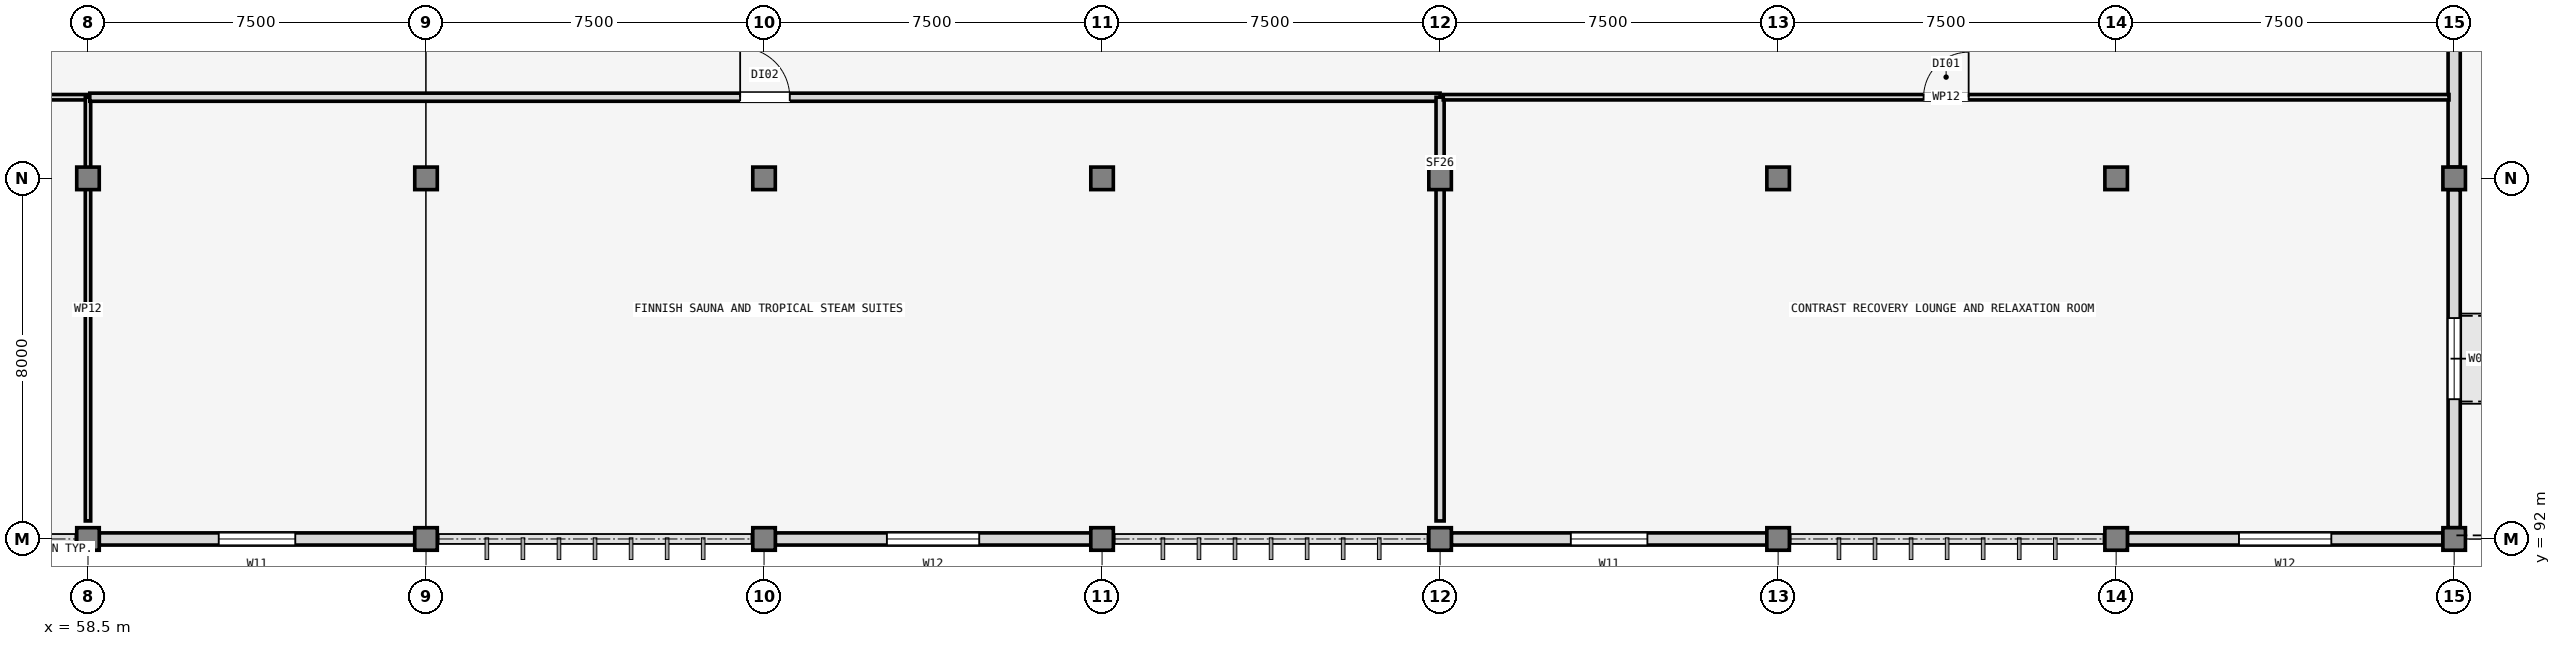
"""IFC4 building model, lengths in metres.
Left out: names, types, materials, properties, quantities, classifications, styles, units other than length and angle.
Written with IfcOpenShell. Run it as: python <this file> out.ifc"""

import sys

from ifc_helpers import new_model, si_unit, direction, frame, frame_2d, origin, origin_2d, place, context, subcontext, project, spatial, rectangle, extrude, element, fill, save


model = new_model("IFC4")
c1 = context("Model", 3, precision=1e-05, world=origin(), true_north=direction((0.0, 1.0)))
c2 = subcontext(c1, "Body", "Model", "MODEL_VIEW")
j1 = project(units=[si_unit("LENGTHUNIT", "METRE"), si_unit("PLANEANGLEUNIT", "RADIAN")], contexts=[c1])
p1 = place(None, origin())
s1 = spatial("IfcSite", under=j1, at=p1, CompositionType="ELEMENT")
p2 = place(p1, origin())
s2 = spatial("IfcBuilding", under=s1, at=p2, CompositionType="ELEMENT")
p3 = place(p2, frame((0.0, 0.0, 13.5)))
s3 = spatial("IfcBuildingStorey", under=s2, at=p3, CompositionType="ELEMENT", Elevation=13.5)
for number, where, z_axis, x_axis in (
    (1, (58.5, 92.0, 0.0), (0.0, 0.0, 1.0), (1.0, 0.0, 0.0)),
    (2, (58.5, 100.0, 0.0), (0.0, 0.0, 1.0), (1.0, 0.0, 0.0)),
    (3, (66.0, 92.0, 0.0), (0.0, 0.0, 1.0), (1.0, 0.0, 0.0)),
    (4, (66.0, 100.0, 0.0), (0.0, 0.0, 1.0), (1.0, 0.0, 0.0)),
    (5, (73.5, 92.0, 0.0), (0.0, 0.0, 1.0), (1.0, 0.0, 0.0)),
    (6, (73.5, 100.0, 0.0), (0.0, 0.0, 1.0), (1.0, 0.0, 0.0)),
    (7, (81.0, 92.0, 0.0), (0.0, 0.0, 1.0), (1.0, 0.0, 0.0)),
    (8, (81.0, 100.0, 0.0), (0.0, 0.0, 1.0), (1.0, 0.0, 0.0)),
    (9, (88.5, 92.0, 0.0), (0.0, 0.0, 1.0), (1.0, 0.0, 0.0)),
    (10, (88.5, 100.0, 0.0), (0.0, 0.0, 1.0), (1.0, 0.0, 0.0)),
    (11, (96.0, 92.0, 0.0), (0.0, 0.0, 1.0), (1.0, 0.0, 0.0)),
    (12, (96.0, 100.0, 0.0), (0.0, 0.0, 1.0), (1.0, 0.0, 0.0)),
    (13, (103.5, 92.0, 0.0), (0.0, 0.0, 1.0), (1.0, 0.0, 0.0)),
    (14, (103.5, 100.0, 0.0), (0.0, 0.0, 1.0), (1.0, 0.0, 0.0)),
    (15, (111.0, 92.0, 0.0), (0.0, 0.0, 1.0), (1.0, 0.0, 0.0)),
    (16, (111.0, 100.0, 0.0), (0.0, 0.0, 1.0), (1.0, 0.0, 0.0)),
):
    element("IfcColumn", number, at=place(p3, frame(where, z_axis=z_axis, x_axis=x_axis)), inside=s3, PredefinedType="COLUMN", context=c2, shape_type="SweptSolid", body=[
        extrude(rectangle(XDim=0.5, YDim=0.5, at=origin_2d()), origin(), (0.0, 0.0, 1.0), 4.2),
    ])
p4 = place(p3, frame((58.75, 92.0, 0.0), z_axis=(0.0, 0.0, 1.0), x_axis=(1.0, 0.0, 0.0)))
e17 = element("IfcWall", 17, at=p4, inside=s3, PredefinedType="SOLIDWALL", context=c2, shape_type="SweptSolid", body=[
    extrude(rectangle(XDim=7.0, YDim=0.27, at=frame_2d((3.5, 0.0))), origin(), (0.0, 0.0, 1.0), 3.44),
])
p5 = place(p4, frame((2.65, 0.0, 0.95)))
e18 = element("IfcOpeningElement", 18, at=p5, cuts=e17, PredefinedType="OPENING", context=c2, shape_type="SweptSolid", body=[
    extrude(rectangle(XDim=1.7, YDim=1.55, at=frame_2d((0.85, 0.775))), frame((0.0, 0.145, 0.0), z_axis=(0.0, -1.0, 0.0), x_axis=(1.0, 0.0, 0.0)), (0.0, 0.0, 1.0), 0.29),
])
p6 = place(p3, frame((73.75, 92.0, 0.0), z_axis=(0.0, 0.0, 1.0), x_axis=(1.0, 0.0, 0.0)))
e19 = element("IfcWall", 19, at=p6, inside=s3, PredefinedType="SOLIDWALL", context=c2, shape_type="SweptSolid", body=[
    extrude(rectangle(XDim=7.0, YDim=0.27, at=frame_2d((3.5, 0.0))), origin(), (0.0, 0.0, 1.0), 3.43),
])
p7 = place(p6, frame((2.475, 0.0, 0.95)))
e20 = element("IfcOpeningElement", 20, at=p7, cuts=e19, PredefinedType="OPENING", context=c2, shape_type="SweptSolid", body=[
    extrude(rectangle(XDim=2.05, YDim=1.4, at=frame_2d((1.025, 0.7))), frame((0.0, 0.145, 0.0), z_axis=(0.0, -1.0, 0.0), x_axis=(1.0, 0.0, 0.0)), (0.0, 0.0, 1.0), 0.29),
])
p8 = place(p3, frame((88.75, 92.0, 0.0), z_axis=(0.0, 0.0, 1.0), x_axis=(1.0, 0.0, 0.0)))
e21 = element("IfcWall", 21, at=p8, inside=s3, PredefinedType="SOLIDWALL", context=c2, shape_type="SweptSolid", body=[
    extrude(rectangle(XDim=7.0, YDim=0.27, at=frame_2d((3.5, 0.0))), origin(), (0.0, 0.0, 1.0), 3.43),
])
p9 = place(p8, frame((2.65, 0.0, 0.95)))
e22 = element("IfcOpeningElement", 22, at=p9, cuts=e21, PredefinedType="OPENING", context=c2, shape_type="SweptSolid", body=[
    extrude(rectangle(XDim=1.7, YDim=1.55, at=frame_2d((0.85, 0.775))), frame((0.0, 0.145, 0.0), z_axis=(0.0, -1.0, 0.0), x_axis=(1.0, 0.0, 0.0)), (0.0, 0.0, 1.0), 0.29),
])
p10 = place(p3, frame((103.75, 92.0, 0.0), z_axis=(0.0, 0.0, 1.0), x_axis=(1.0, 0.0, 0.0)))
e23 = element("IfcWall", 23, at=p10, inside=s3, PredefinedType="SOLIDWALL", context=c2, shape_type="SweptSolid", body=[
    extrude(rectangle(XDim=7.0, YDim=0.27, at=frame_2d((3.5, 0.0))), origin(), (0.0, 0.0, 1.0), 3.43),
])
p11 = place(p10, frame((2.475, 0.0, 0.95)))
e24 = element("IfcOpeningElement", 24, at=p11, cuts=e23, PredefinedType="OPENING", context=c2, shape_type="SweptSolid", body=[
    extrude(rectangle(XDim=2.05, YDim=1.4, at=frame_2d((1.025, 0.7))), frame((0.0, 0.145, 0.0), z_axis=(0.0, -1.0, 0.0), x_axis=(1.0, 0.0, 0.0)), (0.0, 0.0, 1.0), 0.29),
])
p12 = place(p3, frame((111.0, 92.25, 0.0), z_axis=(0.0, 0.0, 1.0), x_axis=(0.0, 1.0, 0.0)))
e25 = element("IfcWall", 25, at=p12, inside=s3, PredefinedType="SOLIDWALL", context=c2, shape_type="SweptSolid", body=[
    extrude(rectangle(XDim=7.5, YDim=0.27, at=frame_2d((3.75, 0.0))), origin(), (0.0, 0.0, 1.0), 3.43),
])
p13 = place(p12, frame((2.85, 0.0, 0.95)))
e26 = element("IfcOpeningElement", 26, at=p13, cuts=e25, PredefinedType="OPENING", context=c2, shape_type="SweptSolid", body=[
    extrude(rectangle(XDim=1.8, YDim=1.5, at=frame_2d((0.9, 0.75))), frame((0.0, 0.145, 0.0), z_axis=(0.0, -1.0, 0.0), x_axis=(1.0, 0.0, 0.0)), (0.0, 0.0, 1.0), 0.29),
])
p14 = place(p3, frame((111.0, 100.25, 0.0), z_axis=(0.0, 0.0, 1.0), x_axis=(0.0, 1.0, 0.0)))
e27 = element("IfcWall", 27, at=p14, inside=s3, PredefinedType="SOLIDWALL", context=c2, shape_type="SweptSolid", body=[
    extrude(rectangle(XDim=7.5, YDim=0.27, at=frame_2d((3.75, 0.0))), origin(), (0.0, 0.0, 1.0), 3.43),
])
p15 = place(p14, frame((2.95, 0.0, 0.0)))
e28 = element("IfcOpeningElement", 28, at=p15, cuts=e27, PredefinedType="OPENING", context=c2, shape_type="SweptSolid", body=[
    extrude(rectangle(XDim=1.6, YDim=2.2, at=frame_2d((0.8, 1.1))), frame((0.0, 0.145, 0.0), z_axis=(0.0, -1.0, 0.0), x_axis=(1.0, 0.0, 0.0)), (0.0, 0.0, 1.0), 0.29),
])
p16 = place(p3, frame((28.2, 101.8, 0.0), z_axis=(0.0, 0.0, 1.0), x_axis=(1.0, 0.0, 0.0)))
e29 = element("IfcWall", 29, at=p16, inside=s3, PredefinedType="PARTITIONING", context=c2, shape_type="SweptSolid", body=[
    extrude(rectangle(XDim=30.3, YDim=0.12, at=frame_2d((15.15, 0.0))), origin(), (0.0, 0.0, 1.0), 3.12),
])
p17 = place(p16, frame((14.65, 0.0, 0.0)))
e30 = element("IfcOpeningElement", 30, at=p17, cuts=e29, PredefinedType="OPENING", context=c2, shape_type="SweptSolid", body=[
    extrude(rectangle(XDim=1.0, YDim=2.1, at=frame_2d((0.5, 1.05))), frame((0.0, 0.07, 0.0), z_axis=(0.0, -1.0, 0.0), x_axis=(1.0, 0.0, 0.0)), (0.0, 0.0, 1.0), 0.14),
])
p18 = place(p3, frame((58.5, 101.8, 0.0), z_axis=(0.0, 0.0, 1.0), x_axis=(0.0, -1.0, 0.0)))
e31 = element("IfcWall", 31, at=p18, inside=s3, PredefinedType="PARTITIONING", context=c2, shape_type="SweptSolid", body=[
    extrude(rectangle(XDim=9.4, YDim=0.12, at=frame_2d((4.7, 0.0))), origin(), (0.0, 0.0, 1.0), 3.12),
])
p19 = place(p3, frame((58.54, 101.8, 0.0), z_axis=(0.0, 0.0, 1.0), x_axis=(1.0, 0.0, 0.0)))
e32 = element("IfcWall", 32, at=p19, inside=s3, PredefinedType="PARTITIONING", context=c2, shape_type="SweptSolid", body=[
    extrude(rectangle(XDim=29.96, YDim=0.18, at=frame_2d((14.98, 0.0))), origin(), (0.0, 0.0, 1.0), 3.12),
])
p20 = place(p19, frame((14.43, 0.0, 0.0)))
e33 = element("IfcOpeningElement", 33, at=p20, cuts=e32, PredefinedType="OPENING", context=c2, shape_type="SweptSolid", body=[
    extrude(rectangle(XDim=1.1, YDim=2.1, at=frame_2d((0.55, 1.05))), frame((0.0, 0.1, 0.0), z_axis=(0.0, -1.0, 0.0), x_axis=(1.0, 0.0, 0.0)), (0.0, 0.0, 1.0), 0.2),
])
p21 = place(p3, frame((88.5, 101.8, 0.0), z_axis=(0.0, 0.0, 1.0), x_axis=(0.0, -1.0, 0.0)))
e34 = element("IfcWall", 34, at=p21, inside=s3, PredefinedType="PARTITIONING", context=c2, shape_type="SweptSolid", body=[
    extrude(rectangle(XDim=9.4, YDim=0.18, at=frame_2d((4.7, 0.0))), origin(), (0.0, 0.0, 1.0), 3.12),
])
p22 = place(p3, frame((88.57, 101.8, 0.0), z_axis=(0.0, 0.0, 1.0), x_axis=(1.0, 0.0, 0.0)))
e35 = element("IfcWall", 35, at=p22, inside=s3, PredefinedType="PARTITIONING", context=c2, shape_type="SweptSolid", body=[
    extrude(rectangle(XDim=22.315, YDim=0.12, at=frame_2d((11.157, 0.0))), origin(), (0.0, 0.0, 1.0), 3.12),
])
p23 = place(p22, frame((10.657, 0.0, 0.0)))
e36 = element("IfcOpeningElement", 36, at=p23, cuts=e35, PredefinedType="OPENING", context=c2, shape_type="SweptSolid", body=[
    extrude(rectangle(XDim=1.0, YDim=2.1, at=frame_2d((0.5, 1.05))), frame((0.0, 0.07, 0.0), z_axis=(0.0, -1.0, 0.0), x_axis=(1.0, 0.0, 0.0)), (0.0, 0.0, 1.0), 0.14),
])
p24 = place(p5, origin())
e37 = element("IfcWindow", 37, at=p24, inside=s3, PartitioningType="SINGLE_PANEL", PredefinedType="WINDOW", context=c2, shape_type="SweptSolid", body=[
    extrude(rectangle(XDim=1.7, YDim=1.55, at=frame_2d((0.85, 0.775))), frame((0.0, 0.03, 0.0), z_axis=(0.0, -1.0, 0.0), x_axis=(1.0, 0.0, 0.0)), (0.0, 0.0, 1.0), 0.06),
])
fill(e18, e37)
p25 = place(p7, origin())
e38 = element("IfcWindow", 38, at=p25, inside=s3, PartitioningType="SINGLE_PANEL", PredefinedType="WINDOW", context=c2, shape_type="SweptSolid", body=[
    extrude(rectangle(XDim=2.05, YDim=1.4, at=frame_2d((1.025, 0.7))), frame((0.0, 0.03, 0.0), z_axis=(0.0, -1.0, 0.0), x_axis=(1.0, 0.0, 0.0)), (0.0, 0.0, 1.0), 0.06),
])
fill(e20, e38)
p26 = place(p9, origin())
e39 = element("IfcWindow", 39, at=p26, inside=s3, PartitioningType="SINGLE_PANEL", PredefinedType="WINDOW", context=c2, shape_type="SweptSolid", body=[
    extrude(rectangle(XDim=1.7, YDim=1.55, at=frame_2d((0.85, 0.775))), frame((0.0, 0.03, 0.0), z_axis=(0.0, -1.0, 0.0), x_axis=(1.0, 0.0, 0.0)), (0.0, 0.0, 1.0), 0.06),
])
fill(e22, e39)
p27 = place(p11, origin())
e40 = element("IfcWindow", 40, at=p27, inside=s3, PartitioningType="SINGLE_PANEL", PredefinedType="WINDOW", context=c2, shape_type="SweptSolid", body=[
    extrude(rectangle(XDim=2.05, YDim=1.4, at=frame_2d((1.025, 0.7))), frame((0.0, 0.03, 0.0), z_axis=(0.0, -1.0, 0.0), x_axis=(1.0, 0.0, 0.0)), (0.0, 0.0, 1.0), 0.06),
])
fill(e24, e40)
p28 = place(p13, origin())
e41 = element("IfcWindow", 41, at=p28, inside=s3, PartitioningType="SINGLE_PANEL", PredefinedType="WINDOW", context=c2, shape_type="SweptSolid", body=[
    extrude(rectangle(XDim=1.8, YDim=1.5, at=frame_2d((0.9, 0.75))), frame((0.0, 0.03, 0.0), z_axis=(0.0, -1.0, 0.0), x_axis=(1.0, 0.0, 0.0)), (0.0, 0.0, 1.0), 0.06),
])
fill(e26, e41)
p29 = place(p20, origin())
e42 = element("IfcDoor", 42, at=p29, inside=s3, OperationType="SINGLE_SWING_LEFT", PredefinedType="DOOR", context=c2, shape_type="SweptSolid", body=[
    extrude(rectangle(XDim=1.1, YDim=2.1, at=frame_2d((0.55, 1.05))), frame((0.0, 0.025, 0.0), z_axis=(0.0, -1.0, 0.0), x_axis=(1.0, 0.0, 0.0)), (0.0, 0.0, 1.0), 0.05),
])
fill(e33, e42)
p30 = place(p23, origin())
e43 = element("IfcDoor", 43, at=p30, inside=s3, OperationType="SINGLE_SWING_RIGHT", PredefinedType="DOOR", context=c2, shape_type="SweptSolid", body=[
    extrude(rectangle(XDim=1.0, YDim=2.1, at=frame_2d((0.5, 1.05))), frame((0.0, 0.025, 0.0), z_axis=(0.0, -1.0, 0.0), x_axis=(1.0, 0.0, 0.0)), (0.0, 0.0, 1.0), 0.05),
])
fill(e36, e43)
save(model, sys.argv[1])
